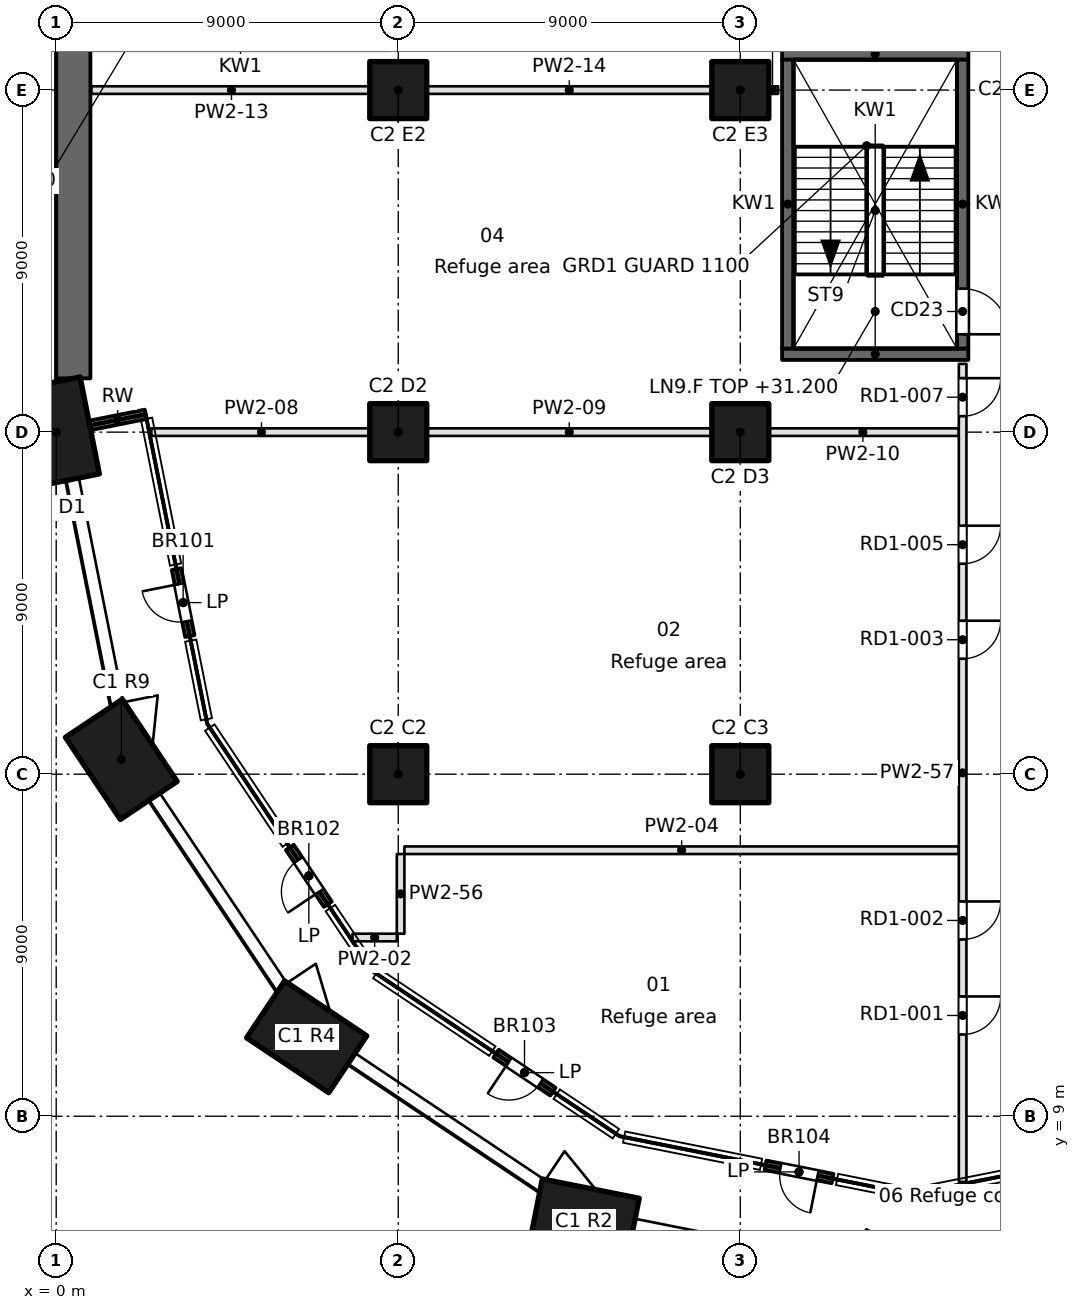
"""IFC4 building model, lengths in metres.
Left out: names, types, materials, properties, quantities, classifications, styles, units other than length and angle.
Written with IfcOpenShell. Run it as: python <this file> out.ifc"""

import sys

from ifc_helpers import new_model, si_unit, direction, frame, frame_2d, origin, origin_2d, place, context, subcontext, project, spatial, rectangle, extrude, element, fill, save


model = new_model("IFC4")
c1 = context("Model", 3, precision=1e-05, world=origin(), true_north=direction((0.0, 1.0)))
c2 = subcontext(c1, "Body", "Model", "MODEL_VIEW")
j1 = project(units=[si_unit("LENGTHUNIT", "METRE"), si_unit("PLANEANGLEUNIT", "RADIAN")], contexts=[c1])
p1 = place(None, origin())
s1 = spatial("IfcSite", under=j1, at=p1, CompositionType="ELEMENT")
p2 = place(p1, origin())
s2 = spatial("IfcBuilding", under=s1, at=p2, CompositionType="ELEMENT")
p3 = place(p2, frame((0.0, 0.0, 31.2)))
s3 = spatial("IfcBuildingStorey", under=s2, at=p3, CompositionType="ELEMENT", Elevation=31.2)
for number, where, z_axis, x_axis in (
    (1, (13.89, 6.213, 0.0), (0.0, 0.0, 1.0), (-0.981, 0.195, 0.0)),
    (2, (6.59, 11.09, 0.0), (0.0, 0.0, 1.0), (-0.831, 0.556, 0.0)),
    (3, (1.713, 18.39, 0.0), (0.0, 0.0, 1.0), (-0.556, 0.831, 0.0)),
    (4, (0.0, 27.0, 0.0), (0.0, 0.0, 1.0), (-0.195, 0.981, 0.0)),
):
    element("IfcColumn", number, at=place(p3, frame(where, z_axis=z_axis, x_axis=x_axis)), inside=s3, PredefinedType="COLUMN", context=c2, shape_type="SweptSolid", body=[
        extrude(rectangle(XDim=2.6, YDim=1.8, at=origin_2d()), origin(), (0.0, 0.0, 1.0), 4.6),
    ])
for number, where, z_axis, x_axis in (
    (5, (9.0, 18.0, 0.0), (0.0, 0.0, 1.0), (1.0, 0.0, 0.0)),
    (6, (9.0, 27.0, 0.0), (0.0, 0.0, 1.0), (1.0, 0.0, 0.0)),
    (7, (9.0, 36.0, 0.0), (0.0, 0.0, 1.0), (1.0, 0.0, 0.0)),
    (8, (18.0, 18.0, 0.0), (0.0, 0.0, 1.0), (1.0, 0.0, 0.0)),
    (9, (18.0, 27.0, 0.0), (0.0, 0.0, 1.0), (1.0, 0.0, 0.0)),
    (10, (18.0, 36.0, 0.0), (0.0, 0.0, 1.0), (1.0, 0.0, 0.0)),
):
    element("IfcColumn", number, at=place(p3, frame(where, z_axis=z_axis, x_axis=x_axis)), inside=s3, PredefinedType="COLUMN", context=c2, shape_type="SweptSolid", body=[
        extrude(rectangle(XDim=1.5, YDim=1.5, at=origin_2d()), origin(), (0.0, 0.0, 1.0), 4.6),
    ])
p4 = place(p3, frame((0.45, 94.5, 0.0), z_axis=(0.0, 0.0, 1.0), x_axis=(0.0, -1.0, 0.0)))
e11 = element("IfcWall", 11, at=p4, inside=s3, PredefinedType="SHEAR", context=c2, shape_type="SweptSolid", body=[
    extrude(rectangle(XDim=66.085, YDim=0.9, at=frame_2d((33.042, 0.0))), origin(), (0.0, 0.0, 1.0), 4.6),
])
p5 = place(p3, frame((0.883, 27.176, 0.0), z_axis=(0.0, 0.0, 1.0), x_axis=(0.980830121099, 0.194864757061, 0.0)))
e12 = element("IfcWall", 12, at=p5, inside=s3, PredefinedType="SOLIDWALL", context=c2, shape_type="SweptSolid", body=[
    extrude(rectangle(XDim=1.501, YDim=0.25, at=frame_2d((0.75, 0.0))), origin(), (0.0, 0.0, 1.0), 4.2),
])
p6 = place(p3, frame((3.165, 23.397, 0.0), z_axis=(0.0, 0.0, 1.0), x_axis=(0.19517704197, -0.980768026746, 0.0)))
e13 = element("IfcWall", 13, at=p6, inside=s3, PredefinedType="SOLIDWALL", context=c2, shape_type="SweptSolid", body=[
    extrude(rectangle(XDim=1.8, YDim=0.25, at=frame_2d((0.9, 0.0))), origin(), (0.0, 0.0, 1.0), 4.2),
])
p7 = place(p6, frame((0.4, 0.0, 0.0)))
e14 = element("IfcOpeningElement", 14, at=p7, cuts=e13, PredefinedType="OPENING", context=c2, shape_type="SweptSolid", body=[
    extrude(rectangle(XDim=1.0, YDim=2.1, at=frame_2d((0.5, 1.05))), frame((0.0, 0.125, 0.0), z_axis=(0.0, -1.0, 0.0), x_axis=(1.0, 0.0, 0.0)), (0.0, 0.0, 1.0), 0.25),
])
p8 = place(p3, frame((6.148, 16.074, 0.0), z_axis=(0.0, 0.0, 1.0), x_axis=(0.555576323502, -0.83146554274, 0.0)))
e15 = element("IfcWall", 15, at=p8, inside=s3, PredefinedType="SOLIDWALL", context=c2, shape_type="SweptSolid", body=[
    extrude(rectangle(XDim=1.8, YDim=0.25, at=frame_2d((0.9, 0.0))), origin(), (0.0, 0.0, 1.0), 4.2),
])
p9 = place(p8, frame((0.4, 0.0, 0.0)))
e16 = element("IfcOpeningElement", 16, at=p9, cuts=e15, PredefinedType="OPENING", context=c2, shape_type="SweptSolid", body=[
    extrude(rectangle(XDim=1.0, YDim=2.1, at=frame_2d((0.5, 1.05))), frame((0.0, 0.125, 0.0), z_axis=(0.0, -1.0, 0.0), x_axis=(1.0, 0.0, 0.0)), (0.0, 0.0, 1.0), 0.25),
])
p10 = place(p3, frame((11.574, 10.648, 0.0), z_axis=(0.0, 0.0, 1.0), x_axis=(0.83146554274, -0.555576323502, 0.0)))
e17 = element("IfcWall", 17, at=p10, inside=s3, PredefinedType="SOLIDWALL", context=c2, shape_type="SweptSolid", body=[
    extrude(rectangle(XDim=1.8, YDim=0.25, at=frame_2d((0.9, 0.0))), origin(), (0.0, 0.0, 1.0), 4.2),
])
p11 = place(p10, frame((0.4, 0.0, 0.0)))
e18 = element("IfcOpeningElement", 18, at=p11, cuts=e17, PredefinedType="OPENING", context=c2, shape_type="SweptSolid", body=[
    extrude(rectangle(XDim=1.0, YDim=2.1, at=frame_2d((0.5, 1.05))), frame((0.0, 0.125, 0.0), z_axis=(0.0, -1.0, 0.0), x_axis=(1.0, 0.0, 0.0)), (0.0, 0.0, 1.0), 0.25),
])
p12 = place(p3, frame((18.663, 7.711, 0.0), z_axis=(0.0, 0.0, 1.0), x_axis=(0.980793982239, -0.195046569833, 0.0)))
e19 = element("IfcWall", 19, at=p12, inside=s3, PredefinedType="SOLIDWALL", context=c2, shape_type="SweptSolid", body=[
    extrude(rectangle(XDim=1.8, YDim=0.25, at=frame_2d((0.9, 0.0))), origin(), (0.0, 0.0, 1.0), 4.2),
])
p13 = place(p12, frame((0.4, 0.0, 0.0)))
e20 = element("IfcOpeningElement", 20, at=p13, cuts=e19, PredefinedType="OPENING", context=c2, shape_type="SweptSolid", body=[
    extrude(rectangle(XDim=1.0, YDim=2.1, at=frame_2d((0.5, 1.05))), frame((0.0, 0.125, 0.0), z_axis=(0.0, -1.0, 0.0), x_axis=(1.0, 0.0, 0.0)), (0.0, 0.0, 1.0), 0.25),
])
for number, where, z_axis, x_axis in (
    (21, (19.1, 29.05, -0.45), (0.0, 0.0, 1.0), (1.0, 0.0, 0.0)),
    (22, (19.1, 36.95, -0.45), (0.0, 0.0, 1.0), (1.0, 0.0, 0.0)),
):
    element("IfcWall", number, at=place(p3, frame(where, z_axis=z_axis, x_axis=x_axis)), inside=s3, PredefinedType="SOLIDWALL", context=c2, shape_type="SweptSolid", body=[
        extrude(rectangle(XDim=4.9, YDim=0.3, at=frame_2d((2.45, 0.0))), origin(), (0.0, 0.0, 1.0), 4.65),
    ])
p14 = place(p3, frame((19.25, 29.2, -0.45), z_axis=(0.0, 0.0, 1.0), x_axis=(0.0, 1.0, 0.0)))
e23 = element("IfcWall", 23, at=p14, inside=s3, PredefinedType="SOLIDWALL", context=c2, shape_type="SweptSolid", body=[
    extrude(rectangle(XDim=7.6, YDim=0.3, at=frame_2d((3.8, 0.0))), origin(), (0.0, 0.0, 1.0), 4.65),
])
p15 = place(p3, frame((23.85, 29.2, -0.45), z_axis=(0.0, 0.0, 1.0), x_axis=(0.0, 1.0, 0.0)))
e24 = element("IfcWall", 24, at=p15, inside=s3, PredefinedType="SOLIDWALL", context=c2, shape_type="SweptSolid", body=[
    extrude(rectangle(XDim=7.6, YDim=0.3, at=frame_2d((3.8, 0.0))), origin(), (0.0, 0.0, 1.0), 4.65),
])
p16 = place(p15, frame((0.375, 0.0, 0.45)))
e25 = element("IfcOpeningElement", 25, at=p16, cuts=e24, PredefinedType="OPENING", context=c2, shape_type="SweptSolid", body=[
    extrude(rectangle(XDim=1.2, YDim=2.1, at=frame_2d((0.6, 1.05))), frame((0.0, 0.15, 0.0), z_axis=(0.0, -1.0, 0.0), x_axis=(1.0, 0.0, 0.0)), (0.0, 0.0, 1.0), 0.3),
])
p17 = place(p3, frame((7.797, 13.703, 0.0), z_axis=(0.0, 0.0, 1.0), x_axis=(1.0, 0.0, 0.0)))
e26 = element("IfcWall", 26, at=p17, inside=s3, PredefinedType="PARTITIONING", context=c2, shape_type="SweptSolid", body=[
    extrude(rectangle(XDim=1.165, YDim=0.2, at=frame_2d((0.583, 0.0))), origin(), (0.0, 0.0, 1.0), 4.2),
])
p18 = place(p3, frame((9.162, 15.999, 0.0), z_axis=(0.0, 0.0, 1.0), x_axis=(1.0, 0.0, 0.0)))
e27 = element("IfcWall", 27, at=p18, inside=s3, PredefinedType="PARTITIONING", context=c2, shape_type="SweptSolid", body=[
    extrude(rectangle(XDim=14.588, YDim=0.2, at=frame_2d((7.294, 0.0))), origin(), (0.0, 0.0, 1.0), 4.2),
])
p19 = place(p3, frame((2.503, 27.0, 0.0), z_axis=(0.0, 0.0, 1.0), x_axis=(1.0, 0.0, 0.0)))
e28 = element("IfcWall", 28, at=p19, inside=s3, PredefinedType="PARTITIONING", context=c2, shape_type="SweptSolid", body=[
    extrude(rectangle(XDim=5.797, YDim=0.2, at=frame_2d((2.898, 0.0))), origin(), (0.0, 0.0, 1.0), 4.2),
])
p20 = place(p3, frame((9.7, 27.0, 0.0), z_axis=(0.0, 0.0, 1.0), x_axis=(1.0, 0.0, 0.0)))
e29 = element("IfcWall", 29, at=p20, inside=s3, PredefinedType="PARTITIONING", context=c2, shape_type="SweptSolid", body=[
    extrude(rectangle(XDim=7.6, YDim=0.2, at=frame_2d((3.8, 0.0))), origin(), (0.0, 0.0, 1.0), 4.2),
])
p21 = place(p3, frame((18.7, 27.0, 0.0), z_axis=(0.0, 0.0, 1.0), x_axis=(1.0, 0.0, 0.0)))
e30 = element("IfcWall", 30, at=p21, inside=s3, PredefinedType="PARTITIONING", context=c2, shape_type="SweptSolid", body=[
    extrude(rectangle(XDim=5.05, YDim=0.2, at=frame_2d((2.525, 0.0))), origin(), (0.0, 0.0, 1.0), 4.2),
])
p22 = place(p3, frame((0.924, 36.0, 0.0), z_axis=(0.0, 0.0, 1.0), x_axis=(1.0, 0.0, 0.0)))
e31 = element("IfcWall", 31, at=p22, inside=s3, PredefinedType="PARTITIONING", context=c2, shape_type="SweptSolid", body=[
    extrude(rectangle(XDim=7.376, YDim=0.2, at=frame_2d((3.688, 0.0))), origin(), (0.0, 0.0, 1.0), 4.2),
])
p23 = place(p3, frame((9.7, 36.0, 0.0), z_axis=(0.0, 0.0, 1.0), x_axis=(1.0, 0.0, 0.0)))
e32 = element("IfcWall", 32, at=p23, inside=s3, PredefinedType="PARTITIONING", context=c2, shape_type="SweptSolid", body=[
    extrude(rectangle(XDim=7.6, YDim=0.2, at=frame_2d((3.8, 0.0))), origin(), (0.0, 0.0, 1.0), 4.2),
])
p24 = place(p3, frame((18.7, 36.0, 0.0), z_axis=(0.0, 0.0, 1.0), x_axis=(1.0, 0.0, 0.0)))
e33 = element("IfcWall", 33, at=p24, inside=s3, PredefinedType="PARTITIONING", context=c2, shape_type="SweptSolid", body=[
    extrude(rectangle(XDim=0.296, YDim=0.2, at=frame_2d((0.148, 0.0))), origin(), (0.0, 0.0, 1.0), 4.2),
])
p25 = place(p3, frame((9.062, 15.899, 0.0), z_axis=(0.0, 0.0, 1.0), x_axis=(0.0, -1.0, 0.0)))
e34 = element("IfcWall", 34, at=p25, inside=s3, PredefinedType="PARTITIONING", context=c2, shape_type="SweptSolid", body=[
    extrude(rectangle(XDim=2.096, YDim=0.2, at=frame_2d((1.048, 0.0))), origin(), (0.0, 0.0, 1.0), 4.2),
])
p26 = place(p3, frame((23.85, 7.272, 0.0), z_axis=(0.0, 0.0, 1.0), x_axis=(0.0, 1.0, 0.0)))
e35 = element("IfcWall", 35, at=p26, inside=s3, PredefinedType="PARTITIONING", context=c2, shape_type="SweptSolid", body=[
    extrude(rectangle(XDim=21.524, YDim=0.2, at=frame_2d((10.762, 0.0))), origin(), (0.0, 0.0, 1.0), 4.2),
])
p27 = place(p26, frame((3.88, 0.0, 0.0)))
e36 = element("IfcOpeningElement", 36, at=p27, cuts=e35, PredefinedType="OPENING", context=c2, shape_type="SweptSolid", body=[
    extrude(rectangle(XDim=1.0, YDim=2.1, at=frame_2d((0.5, 1.05))), frame((0.0, 0.1, 0.0), z_axis=(0.0, -1.0, 0.0), x_axis=(1.0, 0.0, 0.0)), (0.0, 0.0, 1.0), 0.2),
])
p28 = place(p26, frame((6.38, 0.0, 0.0)))
e37 = element("IfcOpeningElement", 37, at=p28, cuts=e35, PredefinedType="OPENING", context=c2, shape_type="SweptSolid", body=[
    extrude(rectangle(XDim=1.0, YDim=2.1, at=frame_2d((0.5, 1.05))), frame((0.0, 0.1, 0.0), z_axis=(0.0, -1.0, 0.0), x_axis=(1.0, 0.0, 0.0)), (0.0, 0.0, 1.0), 0.2),
])
p29 = place(p26, frame((13.766, 0.0, 0.0)))
e38 = element("IfcOpeningElement", 38, at=p29, cuts=e35, PredefinedType="OPENING", context=c2, shape_type="SweptSolid", body=[
    extrude(rectangle(XDim=1.0, YDim=2.1, at=frame_2d((0.5, 1.05))), frame((0.0, 0.1, 0.0), z_axis=(0.0, -1.0, 0.0), x_axis=(1.0, 0.0, 0.0)), (0.0, 0.0, 1.0), 0.2),
])
p30 = place(p26, frame((16.266, 0.0, 0.0)))
e39 = element("IfcOpeningElement", 39, at=p30, cuts=e35, PredefinedType="OPENING", context=c2, shape_type="SweptSolid", body=[
    extrude(rectangle(XDim=1.0, YDim=2.1, at=frame_2d((0.5, 1.05))), frame((0.0, 0.1, 0.0), z_axis=(0.0, -1.0, 0.0), x_axis=(1.0, 0.0, 0.0)), (0.0, 0.0, 1.0), 0.2),
])
p31 = place(p26, frame((20.148, 0.0, 0.0)))
e40 = element("IfcOpeningElement", 40, at=p31, cuts=e35, PredefinedType="OPENING", context=c2, shape_type="SweptSolid", body=[
    extrude(rectangle(XDim=1.0, YDim=2.1, at=frame_2d((0.5, 1.05))), frame((0.0, 0.1, 0.0), z_axis=(0.0, -1.0, 0.0), x_axis=(1.0, 0.0, 0.0)), (0.0, 0.0, 1.0), 0.2),
])
p32 = place(p7, frame((1.0, 0.0, 0.0), z_axis=(0.0, 0.0, 1.0), x_axis=(-1.0, 0.0, 0.0)))
e41 = element("IfcDoor", 41, at=p32, inside=s3, OperationType="SINGLE_SWING_RIGHT", PredefinedType="DOOR", context=c2, shape_type="SweptSolid", body=[
    extrude(rectangle(XDim=1.0, YDim=2.1, at=frame_2d((0.5, 1.05))), frame((0.0, 0.025, 0.0), z_axis=(0.0, -1.0, 0.0), x_axis=(1.0, 0.0, 0.0)), (0.0, 0.0, 1.0), 0.05),
])
fill(e14, e41)
p33 = place(p9, frame((1.0, 0.0, 0.0), z_axis=(0.0, 0.0, 1.0), x_axis=(-1.0, 0.0, 0.0)))
e42 = element("IfcDoor", 42, at=p33, inside=s3, OperationType="SINGLE_SWING_LEFT", PredefinedType="DOOR", context=c2, shape_type="SweptSolid", body=[
    extrude(rectangle(XDim=1.0, YDim=2.1, at=frame_2d((0.5, 1.05))), frame((0.0, 0.025, 0.0), z_axis=(0.0, -1.0, 0.0), x_axis=(1.0, 0.0, 0.0)), (0.0, 0.0, 1.0), 0.05),
])
fill(e16, e42)
p34 = place(p11, frame((1.0, 0.0, 0.0), z_axis=(0.0, 0.0, 1.0), x_axis=(-1.0, 0.0, 0.0)))
e43 = element("IfcDoor", 43, at=p34, inside=s3, OperationType="SINGLE_SWING_RIGHT", PredefinedType="DOOR", context=c2, shape_type="SweptSolid", body=[
    extrude(rectangle(XDim=1.0, YDim=2.1, at=frame_2d((0.5, 1.05))), frame((0.0, 0.025, 0.0), z_axis=(0.0, -1.0, 0.0), x_axis=(1.0, 0.0, 0.0)), (0.0, 0.0, 1.0), 0.05),
])
fill(e18, e43)
p35 = place(p13, frame((1.0, 0.0, 0.0), z_axis=(0.0, 0.0, 1.0), x_axis=(-1.0, 0.0, 0.0)))
e44 = element("IfcDoor", 44, at=p35, inside=s3, OperationType="SINGLE_SWING_LEFT", PredefinedType="DOOR", context=c2, shape_type="SweptSolid", body=[
    extrude(rectangle(XDim=1.0, YDim=2.1, at=frame_2d((0.5, 1.05))), frame((0.0, 0.025, 0.0), z_axis=(0.0, -1.0, 0.0), x_axis=(1.0, 0.0, 0.0)), (0.0, 0.0, 1.0), 0.05),
])
fill(e20, e44)
p36 = place(p16, frame((1.2, 0.0, 0.0), z_axis=(0.0, 0.0, 1.0), x_axis=(-1.0, 0.0, 0.0)))
e45 = element("IfcDoor", 45, at=p36, inside=s3, OperationType="SINGLE_SWING_RIGHT", PredefinedType="DOOR", context=c2, shape_type="SweptSolid", body=[
    extrude(rectangle(XDim=1.2, YDim=2.1, at=frame_2d((0.6, 1.05))), frame((0.0, 0.025, 0.0), z_axis=(0.0, -1.0, 0.0), x_axis=(1.0, 0.0, 0.0)), (0.0, 0.0, 1.0), 0.05),
])
fill(e25, e45)
p37 = place(p27, frame((1.0, 0.0, 0.0), z_axis=(0.0, 0.0, 1.0), x_axis=(-1.0, 0.0, 0.0)))
e46 = element("IfcDoor", 46, at=p37, inside=s3, OperationType="SINGLE_SWING_LEFT", PredefinedType="DOOR", context=c2, shape_type="SweptSolid", body=[
    extrude(rectangle(XDim=1.0, YDim=2.1, at=frame_2d((0.5, 1.05))), frame((0.0, 0.025, 0.0), z_axis=(0.0, -1.0, 0.0), x_axis=(1.0, 0.0, 0.0)), (0.0, 0.0, 1.0), 0.05),
])
fill(e36, e46)
p38 = place(p28, frame((1.0, 0.0, 0.0), z_axis=(0.0, 0.0, 1.0), x_axis=(-1.0, 0.0, 0.0)))
e47 = element("IfcDoor", 47, at=p38, inside=s3, OperationType="SINGLE_SWING_LEFT", PredefinedType="DOOR", context=c2, shape_type="SweptSolid", body=[
    extrude(rectangle(XDim=1.0, YDim=2.1, at=frame_2d((0.5, 1.05))), frame((0.0, 0.025, 0.0), z_axis=(0.0, -1.0, 0.0), x_axis=(1.0, 0.0, 0.0)), (0.0, 0.0, 1.0), 0.05),
])
fill(e37, e47)
p39 = place(p29, frame((1.0, 0.0, 0.0), z_axis=(0.0, 0.0, 1.0), x_axis=(-1.0, 0.0, 0.0)))
e48 = element("IfcDoor", 48, at=p39, inside=s3, OperationType="SINGLE_SWING_LEFT", PredefinedType="DOOR", context=c2, shape_type="SweptSolid", body=[
    extrude(rectangle(XDim=1.0, YDim=2.1, at=frame_2d((0.5, 1.05))), frame((0.0, 0.025, 0.0), z_axis=(0.0, -1.0, 0.0), x_axis=(1.0, 0.0, 0.0)), (0.0, 0.0, 1.0), 0.05),
])
fill(e38, e48)
p40 = place(p30, frame((1.0, 0.0, 0.0), z_axis=(0.0, 0.0, 1.0), x_axis=(-1.0, 0.0, 0.0)))
e49 = element("IfcDoor", 49, at=p40, inside=s3, OperationType="SINGLE_SWING_LEFT", PredefinedType="DOOR", context=c2, shape_type="SweptSolid", body=[
    extrude(rectangle(XDim=1.0, YDim=2.1, at=frame_2d((0.5, 1.05))), frame((0.0, 0.025, 0.0), z_axis=(0.0, -1.0, 0.0), x_axis=(1.0, 0.0, 0.0)), (0.0, 0.0, 1.0), 0.05),
])
fill(e39, e49)
p41 = place(p31, frame((1.0, 0.0, 0.0), z_axis=(0.0, 0.0, 1.0), x_axis=(-1.0, 0.0, 0.0)))
e50 = element("IfcDoor", 50, at=p41, inside=s3, OperationType="SINGLE_SWING_LEFT", PredefinedType="DOOR", context=c2, shape_type="SweptSolid", body=[
    extrude(rectangle(XDim=1.0, YDim=2.1, at=frame_2d((0.5, 1.05))), frame((0.0, 0.025, 0.0), z_axis=(0.0, -1.0, 0.0), x_axis=(1.0, 0.0, 0.0)), (0.0, 0.0, 1.0), 0.05),
])
fill(e40, e50)
save(model, sys.argv[1])
